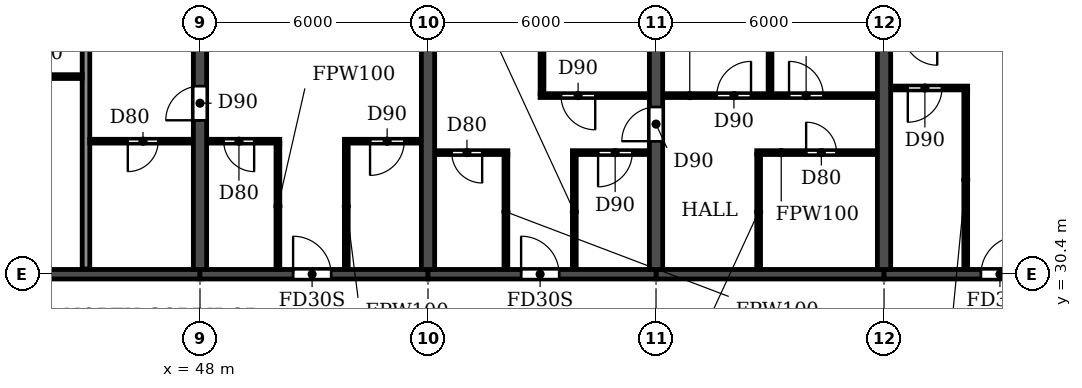
"""IFC4 building model, lengths in metres.
Left out: names, types, materials, properties, quantities, classifications, styles, units other than length and angle.
Written with IfcOpenShell. Run it as: python <this file> out.ifc"""

import sys

from ifc_helpers import new_model, si_unit, direction, frame, frame_2d, origin, place, context, subcontext, project, spatial, rectangle, extrude, element, fill, save


model = new_model("IFC4")
c1 = context("Model", 3, precision=1e-05, world=origin(), true_north=direction((0.0, 1.0)))
c2 = subcontext(c1, "Body", "Model", "MODEL_VIEW")
j1 = project(units=[si_unit("LENGTHUNIT", "METRE"), si_unit("PLANEANGLEUNIT", "RADIAN")], contexts=[c1])
p1 = place(None, origin())
s1 = spatial("IfcSite", under=j1, at=p1, CompositionType="ELEMENT")
p2 = place(p1, origin())
s2 = spatial("IfcBuilding", under=s1, at=p2, CompositionType="ELEMENT")
p3 = place(p2, frame((0.0, 0.0, 92.7)))
s3 = spatial("IfcBuildingStorey", under=s2, at=p3, CompositionType="ELEMENT", Elevation=92.7)
p4 = place(p3, frame((48.0, 30.525, 0.0), z_axis=(0.0, 0.0, 1.0), x_axis=(0.0, 1.0, 0.0)))
e1 = element("IfcWall", 1, at=p4, inside=s3, PredefinedType="SHEAR", context=c2, shape_type="SweptSolid", body=[
    extrude(rectangle(XDim=12.875, YDim=0.35, at=frame_2d((6.438, 0.0))), origin(), (0.0, 0.0, 1.0), 3.06),
])
p5 = place(p4, frame((3.925, 0.0, 0.0)))
e2 = element("IfcOpeningElement", 2, at=p5, cuts=e1, PredefinedType="OPENING", context=c2, shape_type="SweptSolid", body=[
    extrude(rectangle(XDim=0.9, YDim=2.1, at=frame_2d((0.45, 1.05))), frame((0.0, 0.185, 0.0), z_axis=(0.0, -1.0, 0.0), x_axis=(1.0, 0.0, 0.0)), (0.0, 0.0, 1.0), 0.37),
])
p6 = place(p3, frame((54.0, 30.525, 0.0), z_axis=(0.0, 0.0, 1.0), x_axis=(0.0, 1.0, 0.0)))
e3 = element("IfcWall", 3, at=p6, inside=s3, PredefinedType="SHEAR", context=c2, shape_type="SweptSolid", body=[
    extrude(rectangle(XDim=12.875, YDim=0.35, at=frame_2d((6.438, 0.0))), origin(), (0.0, 0.0, 1.0), 3.06),
])
p7 = place(p3, frame((60.0, 30.525, 0.0), z_axis=(0.0, 0.0, 1.0), x_axis=(0.0, 1.0, 0.0)))
e4 = element("IfcWall", 4, at=p7, inside=s3, PredefinedType="SHEAR", context=c2, shape_type="SweptSolid", body=[
    extrude(rectangle(XDim=12.875, YDim=0.35, at=frame_2d((6.438, 0.0))), origin(), (0.0, 0.0, 1.0), 3.06),
])
p8 = place(p7, frame((3.375, 0.0, 0.0)))
e5 = element("IfcOpeningElement", 5, at=p8, cuts=e4, PredefinedType="OPENING", context=c2, shape_type="SweptSolid", body=[
    extrude(rectangle(XDim=0.9, YDim=2.1, at=frame_2d((0.45, 1.05))), frame((0.0, 0.185, 0.0), z_axis=(0.0, -1.0, 0.0), x_axis=(1.0, 0.0, 0.0)), (0.0, 0.0, 1.0), 0.37),
])
p9 = place(p3, frame((66.0, 30.525, 0.0), z_axis=(0.0, 0.0, 1.0), x_axis=(0.0, 1.0, 0.0)))
e6 = element("IfcWall", 6, at=p9, inside=s3, PredefinedType="SHEAR", context=c2, shape_type="SweptSolid", body=[
    extrude(rectangle(XDim=12.875, YDim=0.35, at=frame_2d((6.438, 0.0))), origin(), (0.0, 0.0, 1.0), 3.06),
])
p10 = place(p3, frame((42.0, 30.4, 0.0), z_axis=(0.0, 0.0, 1.0), x_axis=(1.0, 0.0, 0.0)))
e7 = element("IfcWall", 7, at=p10, inside=s3, PredefinedType="SHEAR", context=c2, shape_type="SweptSolid", body=[
    extrude(rectangle(XDim=6.0, YDim=0.25, at=frame_2d((3.0, 0.0))), origin(), (0.0, 0.0, 1.0), 2.46),
])
p11 = place(p3, frame((48.0, 30.4, 0.0), z_axis=(0.0, 0.0, 1.0), x_axis=(1.0, 0.0, 0.0)))
e8 = element("IfcWall", 8, at=p11, inside=s3, PredefinedType="SHEAR", context=c2, shape_type="SweptSolid", body=[
    extrude(rectangle(XDim=6.0, YDim=0.25, at=frame_2d((3.0, 0.0))), origin(), (0.0, 0.0, 1.0), 2.46),
])
p12 = place(p11, frame((2.45, 0.0, 0.0)))
e9 = element("IfcOpeningElement", 9, at=p12, cuts=e8, PredefinedType="OPENING", context=c2, shape_type="SweptSolid", body=[
    extrude(rectangle(XDim=1.0, YDim=2.1, at=frame_2d((0.5, 1.05))), frame((0.0, 0.135, 0.0), z_axis=(0.0, -1.0, 0.0), x_axis=(1.0, 0.0, 0.0)), (0.0, 0.0, 1.0), 0.27),
])
p13 = place(p3, frame((54.0, 30.4, 0.0), z_axis=(0.0, 0.0, 1.0), x_axis=(1.0, 0.0, 0.0)))
e10 = element("IfcWall", 10, at=p13, inside=s3, PredefinedType="SHEAR", context=c2, shape_type="SweptSolid", body=[
    extrude(rectangle(XDim=6.0, YDim=0.25, at=frame_2d((3.0, 0.0))), origin(), (0.0, 0.0, 1.0), 2.46),
])
p14 = place(p13, frame((2.45, 0.0, 0.0)))
e11 = element("IfcOpeningElement", 11, at=p14, cuts=e10, PredefinedType="OPENING", context=c2, shape_type="SweptSolid", body=[
    extrude(rectangle(XDim=1.0, YDim=2.1, at=frame_2d((0.5, 1.05))), frame((0.0, 0.135, 0.0), z_axis=(0.0, -1.0, 0.0), x_axis=(1.0, 0.0, 0.0)), (0.0, 0.0, 1.0), 0.27),
])
p15 = place(p3, frame((60.0, 30.4, 0.0), z_axis=(0.0, 0.0, 1.0), x_axis=(1.0, 0.0, 0.0)))
e12 = element("IfcWall", 12, at=p15, inside=s3, PredefinedType="SHEAR", context=c2, shape_type="SweptSolid", body=[
    extrude(rectangle(XDim=6.0, YDim=0.25, at=frame_2d((3.0, 0.0))), origin(), (0.0, 0.0, 1.0), 2.46),
])
p16 = place(p3, frame((66.0, 30.4, 0.0), z_axis=(0.0, 0.0, 1.0), x_axis=(1.0, 0.0, 0.0)))
e13 = element("IfcWall", 13, at=p16, inside=s3, PredefinedType="SHEAR", context=c2, shape_type="SweptSolid", body=[
    extrude(rectangle(XDim=6.0, YDim=0.25, at=frame_2d((3.0, 0.0))), origin(), (0.0, 0.0, 1.0), 2.46),
])
p17 = place(p16, frame((2.55, 0.0, 0.0)))
e14 = element("IfcOpeningElement", 14, at=p17, cuts=e13, PredefinedType="OPENING", context=c2, shape_type="SweptSolid", body=[
    extrude(rectangle(XDim=1.0, YDim=2.1, at=frame_2d((0.5, 1.05))), frame((0.0, 0.135, 0.0), z_axis=(0.0, -1.0, 0.0), x_axis=(1.0, 0.0, 0.0)), (0.0, 0.0, 1.0), 0.27),
])
p18 = place(p3, frame((45.0, 30.535, 0.0), z_axis=(0.0, 0.0, 1.0), x_axis=(0.0, 1.0, 0.0)))
e15 = element("IfcWall", 15, at=p18, inside=s3, PredefinedType="PARTITIONING", context=c2, shape_type="SweptSolid", body=[
    extrude(rectangle(XDim=13.005, YDim=0.2, at=frame_2d((6.502, 0.0))), origin(), (0.0, 0.0, 1.0), 3.06),
])
p19 = place(p3, frame((54.185, 33.6, 0.0), z_axis=(0.0, 0.0, 1.0), x_axis=(1.0, 0.0, 0.0)))
e16 = element("IfcWall", 16, at=p19, inside=s3, PredefinedType="PARTITIONING", context=c2, shape_type="SweptSolid", body=[
    extrude(rectangle(XDim=1.915, YDim=0.1, at=frame_2d((0.958, 0.0))), origin(), (0.0, 0.0, 1.0), 3.06),
])
p20 = place(p19, frame((0.44, 0.0, 0.0)))
e17 = element("IfcOpeningElement", 17, at=p20, cuts=e16, PredefinedType="OPENING", context=c2, shape_type="SweptSolid", body=[
    extrude(rectangle(XDim=0.8, YDim=2.1, at=frame_2d((0.4, 1.05))), frame((0.0, 0.06, 0.0), z_axis=(0.0, -1.0, 0.0), x_axis=(1.0, 0.0, 0.0)), (0.0, 0.0, 1.0), 0.12),
])
p21 = place(p3, frame((57.8, 33.6, 0.0), z_axis=(0.0, 0.0, 1.0), x_axis=(1.0, 0.0, 0.0)))
e18 = element("IfcWall", 18, at=p21, inside=s3, PredefinedType="PARTITIONING", context=c2, shape_type="SweptSolid", body=[
    extrude(rectangle(XDim=2.015, YDim=0.1, at=frame_2d((1.007, 0.0))), origin(), (0.0, 0.0, 1.0), 3.06),
])
p22 = place(p21, frame((0.675, 0.0, 0.0)))
e19 = element("IfcOpeningElement", 19, at=p22, cuts=e18, PredefinedType="OPENING", context=c2, shape_type="SweptSolid", body=[
    extrude(rectangle(XDim=0.9, YDim=2.1, at=frame_2d((0.45, 1.05))), frame((0.0, 0.06, 0.0), z_axis=(0.0, -1.0, 0.0), x_axis=(1.0, 0.0, 0.0)), (0.0, 0.0, 1.0), 0.12),
])
p23 = place(p3, frame((62.65, 33.6, 0.0), z_axis=(0.0, 0.0, 1.0), x_axis=(1.0, 0.0, 0.0)))
e20 = element("IfcWall", 20, at=p23, inside=s3, PredefinedType="PARTITIONING", context=c2, shape_type="SweptSolid", body=[
    extrude(rectangle(XDim=3.165, YDim=0.1, at=frame_2d((1.583, 0.0))), origin(), (0.0, 0.0, 1.0), 3.06),
])
p24 = place(p23, frame((1.3, 0.0, 0.0)))
e21 = element("IfcOpeningElement", 21, at=p24, cuts=e20, PredefinedType="OPENING", context=c2, shape_type="SweptSolid", body=[
    extrude(rectangle(XDim=0.8, YDim=2.1, at=frame_2d((0.4, 1.05))), frame((0.0, 0.06, 0.0), z_axis=(0.0, -1.0, 0.0), x_axis=(1.0, 0.0, 0.0)), (0.0, 0.0, 1.0), 0.12),
])
p25 = place(p3, frame((45.1, 33.9, 0.0), z_axis=(0.0, 0.0, 1.0), x_axis=(1.0, 0.0, 0.0)))
e22 = element("IfcWall", 22, at=p25, inside=s3, PredefinedType="PARTITIONING", context=c2, shape_type="SweptSolid", body=[
    extrude(rectangle(XDim=2.715, YDim=0.1, at=frame_2d((1.357, 0.0))), origin(), (0.0, 0.0, 1.0), 3.06),
])
p26 = place(p25, frame((1.0, 0.0, 0.0)))
e23 = element("IfcOpeningElement", 23, at=p26, cuts=e22, PredefinedType="OPENING", context=c2, shape_type="SweptSolid", body=[
    extrude(rectangle(XDim=0.8, YDim=2.1, at=frame_2d((0.4, 1.05))), frame((0.0, 0.06, 0.0), z_axis=(0.0, -1.0, 0.0), x_axis=(1.0, 0.0, 0.0)), (0.0, 0.0, 1.0), 0.12),
])
p27 = place(p3, frame((48.185, 33.9, 0.0), z_axis=(0.0, 0.0, 1.0), x_axis=(1.0, 0.0, 0.0)))
e24 = element("IfcWall", 24, at=p27, inside=s3, PredefinedType="PARTITIONING", context=c2, shape_type="SweptSolid", body=[
    extrude(rectangle(XDim=1.915, YDim=0.1, at=frame_2d((0.958, 0.0))), origin(), (0.0, 0.0, 1.0), 3.06),
])
p28 = place(p27, frame((0.44, 0.0, 0.0)))
e25 = element("IfcOpeningElement", 25, at=p28, cuts=e24, PredefinedType="OPENING", context=c2, shape_type="SweptSolid", body=[
    extrude(rectangle(XDim=0.8, YDim=2.1, at=frame_2d((0.4, 1.05))), frame((0.0, 0.06, 0.0), z_axis=(0.0, -1.0, 0.0), x_axis=(1.0, 0.0, 0.0)), (0.0, 0.0, 1.0), 0.12),
])
p29 = place(p3, frame((51.8, 33.9, 0.0), z_axis=(0.0, 0.0, 1.0), x_axis=(1.0, 0.0, 0.0)))
e26 = element("IfcWall", 26, at=p29, inside=s3, PredefinedType="PARTITIONING", context=c2, shape_type="SweptSolid", body=[
    extrude(rectangle(XDim=2.015, YDim=0.1, at=frame_2d((1.007, 0.0))), origin(), (0.0, 0.0, 1.0), 3.06),
])
p30 = place(p29, frame((0.675, 0.0, 0.0)))
e27 = element("IfcOpeningElement", 27, at=p30, cuts=e26, PredefinedType="OPENING", context=c2, shape_type="SweptSolid", body=[
    extrude(rectangle(XDim=0.9, YDim=2.1, at=frame_2d((0.45, 1.05))), frame((0.0, 0.06, 0.0), z_axis=(0.0, -1.0, 0.0), x_axis=(1.0, 0.0, 0.0)), (0.0, 0.0, 1.0), 0.12),
])
p31 = place(p3, frame((56.95, 35.1, 0.0), z_axis=(0.0, 0.0, 1.0), x_axis=(1.0, 0.0, 0.0)))
e28 = element("IfcWall", 28, at=p31, inside=s3, PredefinedType="PARTITIONING", context=c2, shape_type="SweptSolid", body=[
    extrude(rectangle(XDim=2.865, YDim=0.1, at=frame_2d((1.433, 0.0))), origin(), (0.0, 0.0, 1.0), 3.06),
])
p32 = place(p31, frame((0.55, 0.0, 0.0)))
e29 = element("IfcOpeningElement", 29, at=p32, cuts=e28, PredefinedType="OPENING", context=c2, shape_type="SweptSolid", body=[
    extrude(rectangle(XDim=0.9, YDim=2.1, at=frame_2d((0.45, 1.05))), frame((0.0, 0.06, 0.0), z_axis=(0.0, -1.0, 0.0), x_axis=(1.0, 0.0, 0.0)), (0.0, 0.0, 1.0), 0.12),
])
p33 = place(p3, frame((60.185, 35.1, 0.0), z_axis=(0.0, 0.0, 1.0), x_axis=(1.0, 0.0, 0.0)))
e30 = element("IfcWall", 30, at=p33, inside=s3, PredefinedType="PARTITIONING", context=c2, shape_type="SweptSolid", body=[
    extrude(rectangle(XDim=5.63, YDim=0.1, at=frame_2d((2.815, 0.0))), origin(), (0.0, 0.0, 1.0), 3.06),
])
p34 = place(p33, frame((1.415, 0.0, 0.0)))
e31 = element("IfcOpeningElement", 31, at=p34, cuts=e30, PredefinedType="OPENING", context=c2, shape_type="SweptSolid", body=[
    extrude(rectangle(XDim=0.9, YDim=2.1, at=frame_2d((0.45, 1.05))), frame((0.0, 0.06, 0.0), z_axis=(0.0, -1.0, 0.0), x_axis=(1.0, 0.0, 0.0)), (0.0, 0.0, 1.0), 0.12),
])
p35 = place(p33, frame((3.315, 0.0, 0.0)))
e32 = element("IfcOpeningElement", 32, at=p35, cuts=e30, PredefinedType="OPENING", context=c2, shape_type="SweptSolid", body=[
    extrude(rectangle(XDim=0.9, YDim=2.1, at=frame_2d((0.45, 1.05))), frame((0.0, 0.06, 0.0), z_axis=(0.0, -1.0, 0.0), x_axis=(1.0, 0.0, 0.0)), (0.0, 0.0, 1.0), 0.12),
])
p36 = place(p3, frame((66.185, 35.3, 0.0), z_axis=(0.0, 0.0, 1.0), x_axis=(1.0, 0.0, 0.0)))
e33 = element("IfcWall", 33, at=p36, inside=s3, PredefinedType="PARTITIONING", context=c2, shape_type="SweptSolid", body=[
    extrude(rectangle(XDim=2.015, YDim=0.1, at=frame_2d((1.007, 0.0))), origin(), (0.0, 0.0, 1.0), 3.06),
])
p37 = place(p36, frame((0.44, 0.0, 0.0)))
e34 = element("IfcOpeningElement", 34, at=p37, cuts=e33, PredefinedType="OPENING", context=c2, shape_type="SweptSolid", body=[
    extrude(rectangle(XDim=0.9, YDim=2.1, at=frame_2d((0.45, 1.05))), frame((0.0, 0.06, 0.0), z_axis=(0.0, -1.0, 0.0), x_axis=(1.0, 0.0, 0.0)), (0.0, 0.0, 1.0), 0.12),
])
p38 = place(p3, frame((42.185, 35.6, 0.0), z_axis=(0.0, 0.0, 1.0), x_axis=(1.0, 0.0, 0.0)))
e35 = element("IfcWall", 35, at=p38, inside=s3, PredefinedType="PARTITIONING", context=c2, shape_type="SweptSolid", body=[
    extrude(rectangle(XDim=2.715, YDim=0.1, at=frame_2d((1.357, 0.0))), origin(), (0.0, 0.0, 1.0), 3.06),
])
p39 = place(p38, frame((0.915, 0.0, 0.0)))
e36 = element("IfcOpeningElement", 36, at=p39, cuts=e35, PredefinedType="OPENING", context=c2, shape_type="SweptSolid", body=[
    extrude(rectangle(XDim=0.8, YDim=2.1, at=frame_2d((0.4, 1.05))), frame((0.0, 0.06, 0.0), z_axis=(0.0, -1.0, 0.0), x_axis=(1.0, 0.0, 0.0)), (0.0, 0.0, 1.0), 0.12),
])
for number, where, z_axis, x_axis in (
    (37, (50.05, 30.535, 0.0), (0.0, 0.0, 1.0), (0.0, 1.0, 0.0)),
    (38, (51.85, 30.535, 0.0), (0.0, 0.0, 1.0), (0.0, 1.0, 0.0)),
):
    element("IfcWall", number, at=place(p3, frame(where, z_axis=z_axis, x_axis=x_axis)), inside=s3, PredefinedType="PARTITIONING", context=c2, shape_type="SweptSolid", body=[
        extrude(rectangle(XDim=3.315, YDim=0.1, at=frame_2d((1.658, 0.0))), origin(), (0.0, 0.0, 1.0), 3.06),
    ])
p40 = place(p3, frame((56.05, 30.535, 0.0), z_axis=(0.0, 0.0, 1.0), x_axis=(0.0, 1.0, 0.0)))
e39 = element("IfcWall", 39, at=p40, inside=s3, PredefinedType="PARTITIONING", context=c2, shape_type="SweptSolid", body=[
    extrude(rectangle(XDim=3.015, YDim=0.1, at=frame_2d((1.508, 0.0))), origin(), (0.0, 0.0, 1.0), 3.06),
])
p41 = place(p3, frame((57.0, 35.15, 0.0), z_axis=(0.0, 0.0, 1.0), x_axis=(0.0, 1.0, 0.0)))
e40 = element("IfcWall", 40, at=p41, inside=s3, PredefinedType="PARTITIONING", context=c2, shape_type="SweptSolid", body=[
    extrude(rectangle(XDim=8.39, YDim=0.1, at=frame_2d((4.195, 0.0))), origin(), (0.0, 0.0, 1.0), 3.06),
])
for number, where, z_axis, x_axis in (
    (41, (57.85, 30.535, 0.0), (0.0, 0.0, 1.0), (0.0, 1.0, 0.0)),
    (42, (62.7, 30.535, 0.0), (0.0, 0.0, 1.0), (0.0, 1.0, 0.0)),
):
    element("IfcWall", number, at=place(p3, frame(where, z_axis=z_axis, x_axis=x_axis)), inside=s3, PredefinedType="PARTITIONING", context=c2, shape_type="SweptSolid", body=[
        extrude(rectangle(XDim=3.015, YDim=0.1, at=frame_2d((1.508, 0.0))), origin(), (0.0, 0.0, 1.0), 3.06),
    ])
p42 = place(p3, frame((63.0, 35.15, 0.0), z_axis=(0.0, 0.0, 1.0), x_axis=(0.0, 1.0, 0.0)))
e43 = element("IfcWall", 43, at=p42, inside=s3, PredefinedType="PARTITIONING", context=c2, shape_type="SweptSolid", body=[
    extrude(rectangle(XDim=8.39, YDim=0.1, at=frame_2d((4.195, 0.0))), origin(), (0.0, 0.0, 1.0), 3.06),
])
p43 = place(p3, frame((68.15, 30.535, 0.0), z_axis=(0.0, 0.0, 1.0), x_axis=(0.0, 1.0, 0.0)))
e44 = element("IfcWall", 44, at=p43, inside=s3, PredefinedType="PARTITIONING", context=c2, shape_type="SweptSolid", body=[
    extrude(rectangle(XDim=4.715, YDim=0.1, at=frame_2d((2.357, 0.0))), origin(), (0.0, 0.0, 1.0), 3.06),
])
p44 = place(p26, frame((0.8, 0.0, 0.0), z_axis=(0.0, 0.0, 1.0), x_axis=(-1.0, 0.0, 0.0)))
e45 = element("IfcDoor", 45, at=p44, inside=s3, OperationType="SINGLE_SWING_RIGHT", PredefinedType="DOOR", context=c2, shape_type="SweptSolid", body=[
    extrude(rectangle(XDim=0.8, YDim=2.1, at=frame_2d((0.4, 1.05))), frame((0.0, 0.025, 0.0), z_axis=(0.0, -1.0, 0.0), x_axis=(1.0, 0.0, 0.0)), (0.0, 0.0, 1.0), 0.05),
])
fill(e23, e45)
p45 = place(p5, origin())
e46 = element("IfcDoor", 46, at=p45, inside=s3, OperationType="SINGLE_SWING_LEFT", PredefinedType="DOOR", context=c2, shape_type="SweptSolid", body=[
    extrude(rectangle(XDim=0.9, YDim=2.1, at=frame_2d((0.45, 1.05))), frame((0.0, 0.025, 0.0), z_axis=(0.0, -1.0, 0.0), x_axis=(1.0, 0.0, 0.0)), (0.0, 0.0, 1.0), 0.05),
])
fill(e2, e46)
p46 = place(p28, frame((0.8, 0.0, 0.0), z_axis=(0.0, 0.0, 1.0), x_axis=(-1.0, 0.0, 0.0)))
e47 = element("IfcDoor", 47, at=p46, inside=s3, OperationType="SINGLE_SWING_LEFT", PredefinedType="DOOR", context=c2, shape_type="SweptSolid", body=[
    extrude(rectangle(XDim=0.8, YDim=2.1, at=frame_2d((0.4, 1.05))), frame((0.0, 0.025, 0.0), z_axis=(0.0, -1.0, 0.0), x_axis=(1.0, 0.0, 0.0)), (0.0, 0.0, 1.0), 0.05),
])
fill(e25, e47)
p47 = place(p12, origin())
e48 = element("IfcDoor", 48, at=p47, inside=s3, OperationType="SINGLE_SWING_LEFT", PredefinedType="DOOR", context=c2, shape_type="SweptSolid", body=[
    extrude(rectangle(XDim=1.0, YDim=2.1, at=frame_2d((0.5, 1.05))), frame((0.0, 0.025, 0.0), z_axis=(0.0, -1.0, 0.0), x_axis=(1.0, 0.0, 0.0)), (0.0, 0.0, 1.0), 0.05),
])
fill(e9, e48)
p48 = place(p30, frame((0.9, 0.0, 0.0), z_axis=(0.0, 0.0, 1.0), x_axis=(-1.0, 0.0, 0.0)))
e49 = element("IfcDoor", 49, at=p48, inside=s3, OperationType="SINGLE_SWING_RIGHT", PredefinedType="DOOR", context=c2, shape_type="SweptSolid", body=[
    extrude(rectangle(XDim=0.9, YDim=2.1, at=frame_2d((0.45, 1.05))), frame((0.0, 0.025, 0.0), z_axis=(0.0, -1.0, 0.0), x_axis=(1.0, 0.0, 0.0)), (0.0, 0.0, 1.0), 0.05),
])
fill(e27, e49)
p49 = place(p34, origin())
e50 = element("IfcDoor", 50, at=p49, inside=s3, OperationType="SINGLE_SWING_RIGHT", PredefinedType="DOOR", context=c2, shape_type="SweptSolid", body=[
    extrude(rectangle(XDim=0.9, YDim=2.1, at=frame_2d((0.45, 1.05))), frame((0.0, 0.025, 0.0), z_axis=(0.0, -1.0, 0.0), x_axis=(1.0, 0.0, 0.0)), (0.0, 0.0, 1.0), 0.05),
])
fill(e31, e50)
p50 = place(p35, origin())
e51 = element("IfcDoor", 51, at=p50, inside=s3, OperationType="SINGLE_SWING_LEFT", PredefinedType="DOOR", context=c2, shape_type="SweptSolid", body=[
    extrude(rectangle(XDim=0.9, YDim=2.1, at=frame_2d((0.45, 1.05))), frame((0.0, 0.025, 0.0), z_axis=(0.0, -1.0, 0.0), x_axis=(1.0, 0.0, 0.0)), (0.0, 0.0, 1.0), 0.05),
])
fill(e32, e51)
p51 = place(p24, origin())
e52 = element("IfcDoor", 52, at=p51, inside=s3, OperationType="SINGLE_SWING_LEFT", PredefinedType="DOOR", context=c2, shape_type="SweptSolid", body=[
    extrude(rectangle(XDim=0.8, YDim=2.1, at=frame_2d((0.4, 1.05))), frame((0.0, 0.025, 0.0), z_axis=(0.0, -1.0, 0.0), x_axis=(1.0, 0.0, 0.0)), (0.0, 0.0, 1.0), 0.05),
])
fill(e21, e52)
p52 = place(p20, frame((0.8, 0.0, 0.0), z_axis=(0.0, 0.0, 1.0), x_axis=(-1.0, 0.0, 0.0)))
e53 = element("IfcDoor", 53, at=p52, inside=s3, OperationType="SINGLE_SWING_LEFT", PredefinedType="DOOR", context=c2, shape_type="SweptSolid", body=[
    extrude(rectangle(XDim=0.8, YDim=2.1, at=frame_2d((0.4, 1.05))), frame((0.0, 0.025, 0.0), z_axis=(0.0, -1.0, 0.0), x_axis=(1.0, 0.0, 0.0)), (0.0, 0.0, 1.0), 0.05),
])
fill(e17, e53)
p53 = place(p14, origin())
e54 = element("IfcDoor", 54, at=p53, inside=s3, OperationType="SINGLE_SWING_LEFT", PredefinedType="DOOR", context=c2, shape_type="SweptSolid", body=[
    extrude(rectangle(XDim=1.0, YDim=2.1, at=frame_2d((0.5, 1.05))), frame((0.0, 0.025, 0.0), z_axis=(0.0, -1.0, 0.0), x_axis=(1.0, 0.0, 0.0)), (0.0, 0.0, 1.0), 0.05),
])
fill(e11, e54)
p54 = place(p32, frame((0.9, 0.0, 0.0), z_axis=(0.0, 0.0, 1.0), x_axis=(-1.0, 0.0, 0.0)))
e55 = element("IfcDoor", 55, at=p54, inside=s3, OperationType="SINGLE_SWING_LEFT", PredefinedType="DOOR", context=c2, shape_type="SweptSolid", body=[
    extrude(rectangle(XDim=0.9, YDim=2.1, at=frame_2d((0.45, 1.05))), frame((0.0, 0.025, 0.0), z_axis=(0.0, -1.0, 0.0), x_axis=(1.0, 0.0, 0.0)), (0.0, 0.0, 1.0), 0.05),
])
fill(e29, e55)
p55 = place(p22, frame((0.9, 0.0, 0.0), z_axis=(0.0, 0.0, 1.0), x_axis=(-1.0, 0.0, 0.0)))
e56 = element("IfcDoor", 56, at=p55, inside=s3, OperationType="SINGLE_SWING_RIGHT", PredefinedType="DOOR", context=c2, shape_type="SweptSolid", body=[
    extrude(rectangle(XDim=0.9, YDim=2.1, at=frame_2d((0.45, 1.05))), frame((0.0, 0.025, 0.0), z_axis=(0.0, -1.0, 0.0), x_axis=(1.0, 0.0, 0.0)), (0.0, 0.0, 1.0), 0.05),
])
fill(e19, e56)
p56 = place(p8, origin())
e57 = element("IfcDoor", 57, at=p56, inside=s3, OperationType="SINGLE_SWING_LEFT", PredefinedType="DOOR", context=c2, shape_type="SweptSolid", body=[
    extrude(rectangle(XDim=0.9, YDim=2.1, at=frame_2d((0.45, 1.05))), frame((0.0, 0.025, 0.0), z_axis=(0.0, -1.0, 0.0), x_axis=(1.0, 0.0, 0.0)), (0.0, 0.0, 1.0), 0.05),
])
fill(e5, e57)
p57 = place(p37, frame((0.9, 0.0, 0.0), z_axis=(0.0, 0.0, 1.0), x_axis=(-1.0, 0.0, 0.0)))
e58 = element("IfcDoor", 58, at=p57, inside=s3, OperationType="SINGLE_SWING_RIGHT", PredefinedType="DOOR", context=c2, shape_type="SweptSolid", body=[
    extrude(rectangle(XDim=0.9, YDim=2.1, at=frame_2d((0.45, 1.05))), frame((0.0, 0.025, 0.0), z_axis=(0.0, -1.0, 0.0), x_axis=(1.0, 0.0, 0.0)), (0.0, 0.0, 1.0), 0.05),
])
fill(e34, e58)
p58 = place(p17, origin())
e59 = element("IfcDoor", 59, at=p58, inside=s3, OperationType="SINGLE_SWING_RIGHT", PredefinedType="DOOR", context=c2, shape_type="SweptSolid", body=[
    extrude(rectangle(XDim=1.0, YDim=2.1, at=frame_2d((0.5, 1.05))), frame((0.0, 0.025, 0.0), z_axis=(0.0, -1.0, 0.0), x_axis=(1.0, 0.0, 0.0)), (0.0, 0.0, 1.0), 0.05),
])
fill(e14, e59)
save(model, sys.argv[1])
